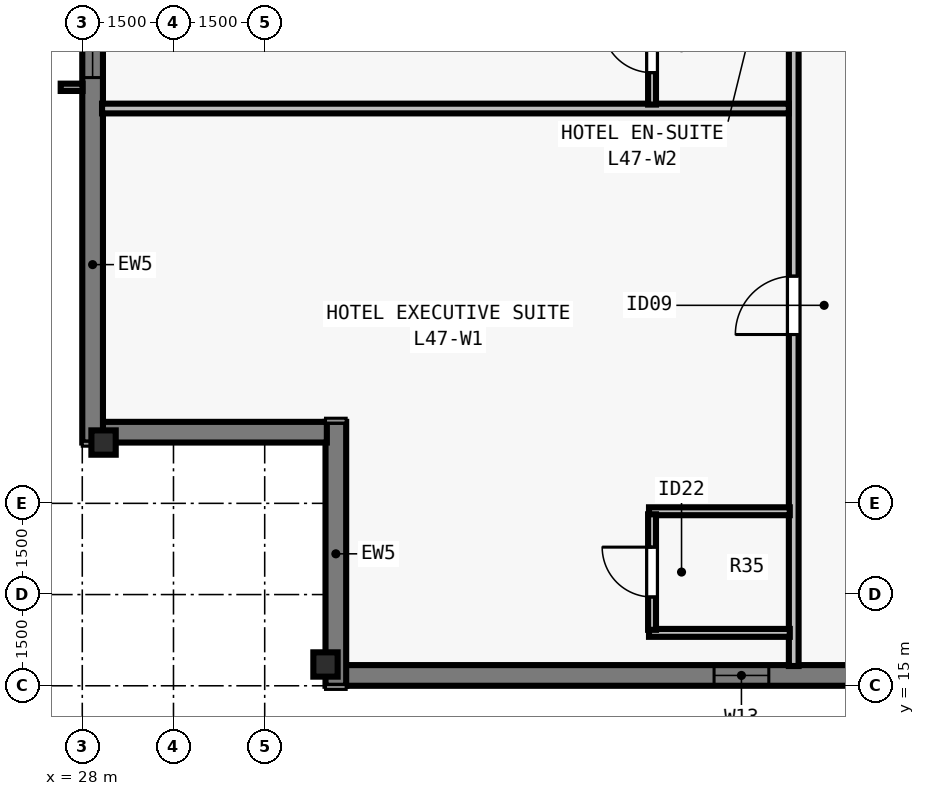
"""IFC4 building model, lengths in metres.
Left out: names, types, materials, properties, quantities, classifications, styles, units other than length and angle.
Written with IfcOpenShell. Run it as: python <this file> out.ifc"""

import sys

from ifc_helpers import new_model, si_unit, direction, frame, frame_2d, origin, origin_2d, place, context, subcontext, project, spatial, rectangle, i_section, extrude, element, fill, save


model = new_model("IFC4")
c1 = context("Model", 3, precision=1e-05, world=origin(), true_north=direction((0.0, 1.0)))
c2 = subcontext(c1, "Body", "Model", "MODEL_VIEW")
j1 = project(units=[si_unit("LENGTHUNIT", "METRE"), si_unit("PLANEANGLEUNIT", "RADIAN")], contexts=[c1])
p1 = place(None, origin())
s1 = spatial("IfcSite", under=j1, at=p1, CompositionType="ELEMENT")
p2 = place(p1, origin())
s2 = spatial("IfcBuilding", under=s1, at=p2, CompositionType="ELEMENT")
p3 = place(p2, frame((0.0, 0.0, 172.5)))
s3 = spatial("IfcBuildingStorey", under=s2, at=p3, CompositionType="ELEMENT", Elevation=172.5)
for number, where, z_axis, x_axis in (
    (1, (32.0, 15.35, 0.0), (0.0, 0.0, 1.0), (1.0, 0.0, 0.0)),
    (2, (28.35, 19.0, 0.0), (0.0, 0.0, 1.0), (0.0, 1.0, 0.0)),
):
    element("IfcColumn", number, at=place(p3, frame(where, z_axis=z_axis, x_axis=x_axis)), inside=s3, PredefinedType="COLUMN", context=c2, shape_type="SweptSolid", body=[
        extrude(i_section(OverallWidth=0.4, OverallDepth=0.4, WebThickness=0.022, FlangeThickness=0.036, at=origin_2d()), origin(), (0.0, 0.0, 1.0), 3.5),
    ])
p4 = place(p3, frame((72.0, 15.17, 0.0), z_axis=(0.0, 0.0, 1.0), x_axis=(-1.0, 0.0, 0.0)))
e3 = element("IfcWall", 3, at=p4, inside=s3, PredefinedType="SOLIDWALL", context=c2, shape_type="SweptSolid", body=[
    extrude(rectangle(XDim=39.682, YDim=0.34, at=frame_2d((19.841, 0.0))), origin(), (0.0, 0.0, 1.0), 3.28),
])
p5 = place(p4, frame((8.505, 0.0, 0.8)))
e4 = element("IfcOpeningElement", 4, at=p5, cuts=e3, PredefinedType="OPENING", context=c2, shape_type="SweptSolid", body=[
    extrude(rectangle(XDim=1.35, YDim=1.66, at=frame_2d((0.675, 0.83))), frame((0.0, 0.18, 0.0), z_axis=(0.0, -1.0, 0.0), x_axis=(1.0, 0.0, 0.0)), (0.0, 0.0, 1.0), 0.36),
])
p6 = place(p4, frame((11.859, 0.0, 0.8)))
e5 = element("IfcOpeningElement", 5, at=p6, cuts=e3, PredefinedType="OPENING", context=c2, shape_type="SweptSolid", body=[
    extrude(rectangle(XDim=1.75, YDim=1.66, at=frame_2d((0.875, 0.83))), frame((0.0, 0.18, 0.0), z_axis=(0.0, -1.0, 0.0), x_axis=(1.0, 0.0, 0.0)), (0.0, 0.0, 1.0), 0.36),
])
p7 = place(p4, frame((16.062, 0.0, 0.8)))
e6 = element("IfcOpeningElement", 6, at=p7, cuts=e3, PredefinedType="OPENING", context=c2, shape_type="SweptSolid", body=[
    extrude(rectangle(XDim=1.35, YDim=1.66, at=frame_2d((0.675, 0.83))), frame((0.0, 0.18, 0.0), z_axis=(0.0, -1.0, 0.0), x_axis=(1.0, 0.0, 0.0)), (0.0, 0.0, 1.0), 0.36),
])
p8 = place(p4, frame((18.966, 0.0, 0.8)))
e7 = element("IfcOpeningElement", 7, at=p8, cuts=e3, PredefinedType="OPENING", context=c2, shape_type="SweptSolid", body=[
    extrude(rectangle(XDim=1.75, YDim=1.66, at=frame_2d((0.875, 0.83))), frame((0.0, 0.18, 0.0), z_axis=(0.0, -1.0, 0.0), x_axis=(1.0, 0.0, 0.0)), (0.0, 0.0, 1.0), 0.36),
])
p9 = place(p4, frame((21.469, 0.0, 0.8)))
e8 = element("IfcOpeningElement", 8, at=p9, cuts=e3, PredefinedType="OPENING", context=c2, shape_type="SweptSolid", body=[
    extrude(rectangle(XDim=1.35, YDim=1.66, at=frame_2d((0.675, 0.83))), frame((0.0, 0.18, 0.0), z_axis=(0.0, -1.0, 0.0), x_axis=(1.0, 0.0, 0.0)), (0.0, 0.0, 1.0), 0.36),
])
p10 = place(p4, frame((26.073, 0.0, 0.8)))
e9 = element("IfcOpeningElement", 9, at=p10, cuts=e3, PredefinedType="OPENING", context=c2, shape_type="SweptSolid", body=[
    extrude(rectangle(XDim=1.75, YDim=1.66, at=frame_2d((0.875, 0.83))), frame((0.0, 0.18, 0.0), z_axis=(0.0, -1.0, 0.0), x_axis=(1.0, 0.0, 0.0)), (0.0, 0.0, 1.0), 0.36),
])
p11 = place(p4, frame((32.71, 0.0, 0.8)))
e10 = element("IfcOpeningElement", 10, at=p11, cuts=e3, PredefinedType="OPENING", context=c2, shape_type="SweptSolid", body=[
    extrude(rectangle(XDim=0.9, YDim=1.66, at=frame_2d((0.45, 0.83))), frame((0.0, 0.18, 0.0), z_axis=(0.0, -1.0, 0.0), x_axis=(1.0, 0.0, 0.0)), (0.0, 0.0, 1.0), 0.36),
])
p12 = place(p3, frame((32.17, 15.0, 0.0), z_axis=(0.0, 0.0, 1.0), x_axis=(0.0, 1.0, 0.0)))
e11 = element("IfcWall", 11, at=p12, inside=s3, PredefinedType="SOLIDWALL", context=c2, shape_type="SweptSolid", body=[
    extrude(rectangle(XDim=4.34, YDim=0.34, at=frame_2d((2.17, 0.0))), origin(), (0.0, 0.0, 1.0), 3.28),
])
p13 = place(p3, frame((32.022, 19.17, 0.0), z_axis=(0.0, 0.0, 1.0), x_axis=(-1.0, 0.0, 0.0)))
e12 = element("IfcWall", 12, at=p13, inside=s3, PredefinedType="SOLIDWALL", context=c2, shape_type="SweptSolid", body=[
    extrude(rectangle(XDim=3.704, YDim=0.34, at=frame_2d((1.852, 0.0))), origin(), (0.0, 0.0, 1.0), 3.28),
])
p14 = place(p3, frame((28.17, 19.0, 0.0), z_axis=(0.0, 0.0, 1.0), x_axis=(0.0, 1.0, 0.0)))
e13 = element("IfcWall", 13, at=p14, inside=s3, PredefinedType="SOLIDWALL", context=c2, shape_type="SweptSolid", body=[
    extrude(rectangle(XDim=39.682, YDim=0.34, at=frame_2d((19.841, 0.0))), origin(), (0.0, 0.0, 1.0), 3.28),
])
p15 = place(p14, frame((6.002, 0.0, 0.8)))
e14 = element("IfcOpeningElement", 14, at=p15, cuts=e13, PredefinedType="OPENING", context=c2, shape_type="SweptSolid", body=[
    extrude(rectangle(XDim=1.75, YDim=1.66, at=frame_2d((0.875, 0.83))), frame((0.0, 0.18, 0.0), z_axis=(0.0, -1.0, 0.0), x_axis=(1.0, 0.0, 0.0)), (0.0, 0.0, 1.0), 0.36),
])
p16 = place(p14, frame((8.505, 0.0, 0.8)))
e15 = element("IfcOpeningElement", 15, at=p16, cuts=e13, PredefinedType="OPENING", context=c2, shape_type="SweptSolid", body=[
    extrude(rectangle(XDim=1.35, YDim=1.66, at=frame_2d((0.675, 0.83))), frame((0.0, 0.18, 0.0), z_axis=(0.0, -1.0, 0.0), x_axis=(1.0, 0.0, 0.0)), (0.0, 0.0, 1.0), 0.36),
])
p17 = place(p14, frame((11.859, 0.0, 0.8)))
e16 = element("IfcOpeningElement", 16, at=p17, cuts=e13, PredefinedType="OPENING", context=c2, shape_type="SweptSolid", body=[
    extrude(rectangle(XDim=1.75, YDim=1.66, at=frame_2d((0.875, 0.83))), frame((0.0, 0.18, 0.0), z_axis=(0.0, -1.0, 0.0), x_axis=(1.0, 0.0, 0.0)), (0.0, 0.0, 1.0), 0.36),
])
p18 = place(p14, frame((16.062, 0.0, 0.8)))
e17 = element("IfcOpeningElement", 17, at=p18, cuts=e13, PredefinedType="OPENING", context=c2, shape_type="SweptSolid", body=[
    extrude(rectangle(XDim=1.35, YDim=1.66, at=frame_2d((0.675, 0.83))), frame((0.0, 0.18, 0.0), z_axis=(0.0, -1.0, 0.0), x_axis=(1.0, 0.0, 0.0)), (0.0, 0.0, 1.0), 0.36),
])
p19 = place(p14, frame((18.966, 0.0, 0.8)))
e18 = element("IfcOpeningElement", 18, at=p19, cuts=e13, PredefinedType="OPENING", context=c2, shape_type="SweptSolid", body=[
    extrude(rectangle(XDim=1.75, YDim=1.66, at=frame_2d((0.875, 0.83))), frame((0.0, 0.18, 0.0), z_axis=(0.0, -1.0, 0.0), x_axis=(1.0, 0.0, 0.0)), (0.0, 0.0, 1.0), 0.36),
])
p20 = place(p14, frame((22.27, 0.0, 0.8)))
e19 = element("IfcOpeningElement", 19, at=p20, cuts=e13, PredefinedType="OPENING", context=c2, shape_type="SweptSolid", body=[
    extrude(rectangle(XDim=1.35, YDim=1.66, at=frame_2d((0.675, 0.83))), frame((0.0, 0.18, 0.0), z_axis=(0.0, -1.0, 0.0), x_axis=(1.0, 0.0, 0.0)), (0.0, 0.0, 1.0), 0.36),
])
p21 = place(p14, frame((26.073, 0.0, 0.8)))
e20 = element("IfcOpeningElement", 20, at=p21, cuts=e13, PredefinedType="OPENING", context=c2, shape_type="SweptSolid", body=[
    extrude(rectangle(XDim=1.75, YDim=1.66, at=frame_2d((0.875, 0.83))), frame((0.0, 0.18, 0.0), z_axis=(0.0, -1.0, 0.0), x_axis=(1.0, 0.0, 0.0)), (0.0, 0.0, 1.0), 0.36),
])
p22 = place(p14, frame((29.827, 0.0, 0.8)))
e21 = element("IfcOpeningElement", 21, at=p22, cuts=e13, PredefinedType="OPENING", context=c2, shape_type="SweptSolid", body=[
    extrude(rectangle(XDim=1.35, YDim=1.66, at=frame_2d((0.675, 0.83))), frame((0.0, 0.18, 0.0), z_axis=(0.0, -1.0, 0.0), x_axis=(1.0, 0.0, 0.0)), (0.0, 0.0, 1.0), 0.36),
])
p23 = place(p14, frame((32.33, 0.0, 0.8)))
e22 = element("IfcOpeningElement", 22, at=p23, cuts=e13, PredefinedType="OPENING", context=c2, shape_type="SweptSolid", body=[
    extrude(rectangle(XDim=1.75, YDim=1.66, at=frame_2d((0.875, 0.83))), frame((0.0, 0.18, 0.0), z_axis=(0.0, -1.0, 0.0), x_axis=(1.0, 0.0, 0.0)), (0.0, 0.0, 1.0), 0.36),
])
p24 = place(p3, frame((39.7, 15.325, 0.0), z_axis=(0.0, 0.0, 1.0), x_axis=(0.0, 1.0, 0.0)))
e23 = element("IfcWall", 23, at=p24, inside=s3, PredefinedType="PARTITIONING", context=c2, shape_type="SweptSolid", body=[
    extrude(rectangle(XDim=47.35, YDim=0.16, at=frame_2d((23.675, 0.0))), origin(), (0.0, 0.0, 1.0), 2.555),
])
p25 = place(p24, frame((5.451, 0.0, 0.0)))
e24 = element("IfcOpeningElement", 24, at=p25, cuts=e23, PredefinedType="OPENING", context=c2, shape_type="SweptSolid", body=[
    extrude(rectangle(XDim=0.96, YDim=2.15, at=frame_2d((0.48, 1.075))), frame((0.0, 0.09, 0.0), z_axis=(0.0, -1.0, 0.0), x_axis=(1.0, 0.0, 0.0)), (0.0, 0.0, 1.0), 0.18),
])
p26 = place(p24, frame((14.783, 0.0, 0.0)))
e25 = element("IfcOpeningElement", 25, at=p26, cuts=e23, PredefinedType="OPENING", context=c2, shape_type="SweptSolid", body=[
    extrude(rectangle(XDim=0.96, YDim=2.15, at=frame_2d((0.48, 1.075))), frame((0.0, 0.09, 0.0), z_axis=(0.0, -1.0, 0.0), x_axis=(1.0, 0.0, 0.0)), (0.0, 0.0, 1.0), 0.18),
])
p27 = place(p24, frame((24.215, 0.0, 0.0)))
e26 = element("IfcOpeningElement", 26, at=p27, cuts=e23, PredefinedType="OPENING", context=c2, shape_type="SweptSolid", body=[
    extrude(rectangle(XDim=0.96, YDim=2.15, at=frame_2d((0.48, 1.075))), frame((0.0, 0.09, 0.0), z_axis=(0.0, -1.0, 0.0), x_axis=(1.0, 0.0, 0.0)), (0.0, 0.0, 1.0), 0.18),
])
p28 = place(p24, frame((33.647, 0.0, 0.0)))
e27 = element("IfcOpeningElement", 27, at=p28, cuts=e23, PredefinedType="OPENING", context=c2, shape_type="SweptSolid", body=[
    extrude(rectangle(XDim=0.96, YDim=2.15, at=frame_2d((0.48, 1.075))), frame((0.0, 0.09, 0.0), z_axis=(0.0, -1.0, 0.0), x_axis=(1.0, 0.0, 0.0)), (0.0, 0.0, 1.0), 0.18),
])
p29 = place(p24, frame((43.258, 0.0, 0.0)))
e28 = element("IfcOpeningElement", 28, at=p29, cuts=e23, PredefinedType="OPENING", context=c2, shape_type="SweptSolid", body=[
    extrude(rectangle(XDim=0.96, YDim=2.15, at=frame_2d((0.48, 1.075))), frame((0.0, 0.09, 0.0), z_axis=(0.0, -1.0, 0.0), x_axis=(1.0, 0.0, 0.0)), (0.0, 0.0, 1.0), 0.18),
])
for number, where, z_axis, x_axis in (
    (29, (37.32, 15.87, 0.0), (0.0, 0.0, 1.0), (1.0, 0.0, 0.0)),
    (30, (37.32, 17.87, 0.0), (0.0, 0.0, 1.0), (1.0, 0.0, 0.0)),
):
    element("IfcWall", number, at=place(p3, frame(where, z_axis=z_axis, x_axis=x_axis)), inside=s3, PredefinedType="PLUMBINGWALL", context=c2, shape_type="SweptSolid", body=[
        extrude(rectangle(XDim=2.315, YDim=0.13, at=frame_2d((1.157, 0.0))), origin(), (0.0, 0.0, 1.0), 3.28),
    ])
p30 = place(p3, frame((37.37, 15.92, 0.0), z_axis=(0.0, 0.0, 1.0), x_axis=(0.0, 1.0, 0.0)))
e31 = element("IfcWall", 31, at=p30, inside=s3, PredefinedType="PLUMBINGWALL", context=c2, shape_type="SweptSolid", body=[
    extrude(rectangle(XDim=1.9, YDim=0.13, at=frame_2d((0.95, 0.0))), origin(), (0.0, 0.0, 1.0), 3.28),
])
p31 = place(p30, frame((0.54, 0.0, 0.0)))
e32 = element("IfcOpeningElement", 32, at=p31, cuts=e31, PredefinedType="OPENING", context=c2, shape_type="SweptSolid", body=[
    extrude(rectangle(XDim=0.82, YDim=2.1, at=frame_2d((0.41, 1.05))), frame((0.0, 0.075, 0.0), z_axis=(0.0, -1.0, 0.0), x_axis=(1.0, 0.0, 0.0)), (0.0, 0.0, 1.0), 0.15),
])
p32 = place(p3, frame((28.325, 24.493, 0.0), z_axis=(0.0, 0.0, 1.0), x_axis=(1.0, 0.0, 0.0)))
e33 = element("IfcWall", 33, at=p32, inside=s3, PredefinedType="PARTITIONING", context=c2, shape_type="SweptSolid", body=[
    extrude(rectangle(XDim=11.295, YDim=0.16, at=frame_2d((5.647, 0.0))), origin(), (0.0, 0.0, 1.0), 2.896),
])
p33 = place(p3, frame((37.37, 24.558, 0.0), z_axis=(0.0, 0.0, 1.0), x_axis=(0.0, 1.0, 0.0)))
e34 = element("IfcWall", 34, at=p33, inside=s3, PredefinedType="PLUMBINGWALL", context=c2, shape_type="SweptSolid", body=[
    extrude(rectangle(XDim=1.885, YDim=0.13, at=frame_2d((0.942, 0.0))), origin(), (0.0, 0.0, 1.0), 3.28),
])
p34 = place(p33, frame((0.525, 0.0, 0.0)))
e35 = element("IfcOpeningElement", 35, at=p34, cuts=e34, PredefinedType="OPENING", context=c2, shape_type="SweptSolid", body=[
    extrude(rectangle(XDim=0.82, YDim=2.1, at=frame_2d((0.41, 1.05))), frame((0.0, 0.075, 0.0), z_axis=(0.0, -1.0, 0.0), x_axis=(1.0, 0.0, 0.0)), (0.0, 0.0, 1.0), 0.15),
])
p35 = place(p15, origin())
e36 = element("IfcWindow", 36, at=p35, inside=s3, PartitioningType="SINGLE_PANEL", PredefinedType="WINDOW", context=c2, shape_type="SweptSolid", body=[
    extrude(rectangle(XDim=1.75, YDim=1.66, at=frame_2d((0.875, 0.83))), frame((0.0, -0.05, 0.0), z_axis=(0.0, -1.0, 0.0), x_axis=(1.0, 0.0, 0.0)), (0.0, 0.0, 1.0), 0.06),
])
fill(e14, e36)
p36 = place(p11, origin())
e37 = element("IfcWindow", 37, at=p36, inside=s3, PartitioningType="SINGLE_PANEL", PredefinedType="WINDOW", context=c2, shape_type="SweptSolid", body=[
    extrude(rectangle(XDim=0.9, YDim=1.66, at=frame_2d((0.45, 0.83))), frame((0.0, -0.04, 0.0), z_axis=(0.0, -1.0, 0.0), x_axis=(1.0, 0.0, 0.0)), (0.0, 0.0, 1.0), 0.06),
])
fill(e10, e37)
p37 = place(p31, origin())
e38 = element("IfcDoor", 38, at=p37, inside=s3, OperationType="SINGLE_SWING_RIGHT", PredefinedType="DOOR", context=c2, shape_type="SweptSolid", body=[
    extrude(rectangle(XDim=0.82, YDim=2.1, at=frame_2d((0.41, 1.05))), frame((0.0, 0.025, 0.0), z_axis=(0.0, -1.0, 0.0), x_axis=(1.0, 0.0, 0.0)), (0.0, 0.0, 1.0), 0.05),
])
fill(e32, e38)
p38 = place(p25, origin())
e39 = element("IfcDoor", 39, at=p38, inside=s3, OperationType="SINGLE_SWING_LEFT", PredefinedType="DOOR", context=c2, shape_type="SweptSolid", body=[
    extrude(rectangle(XDim=0.96, YDim=2.15, at=frame_2d((0.48, 1.075))), frame((0.0, 0.025, 0.0), z_axis=(0.0, -1.0, 0.0), x_axis=(1.0, 0.0, 0.0)), (0.0, 0.0, 1.0), 0.05),
])
fill(e24, e39)
p39 = place(p34, origin())
e40 = element("IfcDoor", 40, at=p39, inside=s3, OperationType="SINGLE_SWING_RIGHT", PredefinedType="DOOR", context=c2, shape_type="SweptSolid", body=[
    extrude(rectangle(XDim=0.82, YDim=2.1, at=frame_2d((0.41, 1.05))), frame((0.0, 0.025, 0.0), z_axis=(0.0, -1.0, 0.0), x_axis=(1.0, 0.0, 0.0)), (0.0, 0.0, 1.0), 0.05),
])
fill(e35, e40)
save(model, sys.argv[1])
